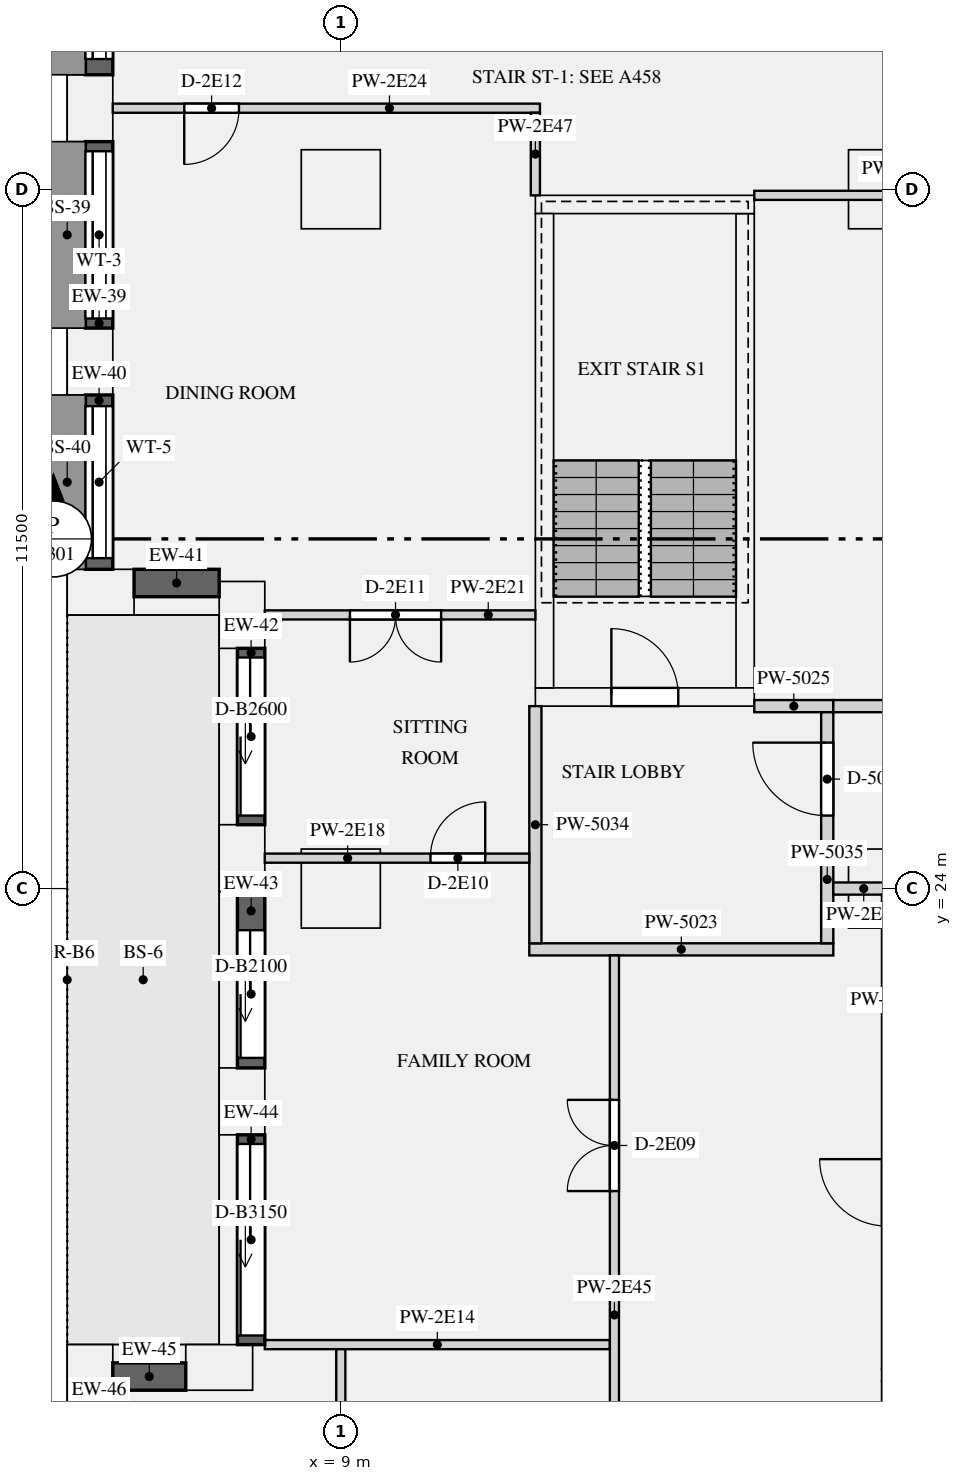
"""IFC4 building model, lengths in metres.
Left out: names, types, materials, properties, quantities, classifications, styles, units other than length and angle.
Written with IfcOpenShell. Run it as: python <this file> out.ifc"""

import sys

from ifc_helpers import new_model, si_unit, direction, frame, frame_2d, origin, origin_2d, place, context, subcontext, project, spatial, rectangle, extrude, element, fill, save


model = new_model("IFC4")
c1 = context("Model", 3, precision=1e-05, world=origin(), true_north=direction((0.0, 1.0)))
c2 = subcontext(c1, "Body", "Model", "MODEL_VIEW")
j1 = project(units=[si_unit("LENGTHUNIT", "METRE"), si_unit("PLANEANGLEUNIT", "RADIAN")], contexts=[c1])
p1 = place(None, origin())
s1 = spatial("IfcSite", under=j1, at=p1, CompositionType="ELEMENT")
p2 = place(p1, origin())
s2 = spatial("IfcBuilding", under=s1, at=p2, CompositionType="ELEMENT")
p3 = place(p2, frame((0.0, 0.0, 118.2)))
s3 = spatial("IfcBuildingStorey", under=s2, at=p3, CompositionType="ELEMENT", Elevation=118.2)
for number, where, z_axis, x_axis in (
    (1, (4.875, 36.833, 0.0), (0.0, 0.0, 1.0), (0.0, -1.0, 0.0)),
    (2, (4.875, 32.667, 0.0), (0.0, 0.0, 1.0), (0.0, -1.0, 0.0)),
    (3, (5.05, 28.875, 0.0), (0.0, 0.0, 1.0), (1.0, 0.0, 0.0)),
    (4, (7.375, 28.5, 0.0), (0.0, 0.0, 1.0), (0.0, -1.0, 0.0)),
    (5, (7.375, 24.5, 0.0), (0.0, 0.0, 1.0), (0.0, -1.0, 0.0)),
    (6, (7.375, 20.5, 0.0), (0.0, 0.0, 1.0), (0.0, -1.0, 0.0)),
    (7, (7.0, 16.125, 0.0), (0.0, 0.0, 1.0), (-1.0, 0.0, 0.0)),
    (8, (4.875, 15.95, 0.0), (0.0, 0.0, 1.0), (0.0, -1.0, 0.0)),
):
    element("IfcColumn", number, at=place(p3, frame(where, z_axis=z_axis, x_axis=x_axis)), inside=s3, PredefinedType="USERDEFINED", context=c2, shape_type="SweptSolid", body=[
        extrude(rectangle(XDim=1.1, YDim=0.75, at=origin_2d()), origin(), (0.0, 0.0, 1.0), 3.15),
    ])
for number, where, z_axis, x_axis in (
    (9, (9.0, 24.0, 0.0), (0.0, 0.0, 1.0), (1.0, 0.0, 0.0)),
    (10, (18.0, 24.0, 0.0), (0.0, 0.0, 1.0), (1.0, 0.0, 0.0)),
    (11, (9.0, 35.5, 0.0), (0.0, 0.0, 1.0), (1.0, 0.0, 0.0)),
    (12, (18.0, 35.5, 0.0), (0.0, 0.0, 1.0), (1.0, 0.0, 0.0)),
):
    element("IfcColumn", number, at=place(p3, frame(where, z_axis=z_axis, x_axis=x_axis)), inside=s3, PredefinedType="COLUMN", context=c2, shape_type="SweptSolid", body=[
        extrude(rectangle(XDim=1.3, YDim=1.3, at=origin_2d()), origin(), (0.0, 0.0, 1.0), 3.15),
    ])
p4 = place(p3, frame((12.2, 27.15, 0.0), z_axis=(0.0, 0.0, 1.0), x_axis=(1.0, 0.0, 0.0)))
e13 = element("IfcWall", 13, at=p4, inside=s3, PredefinedType="SHEAR", context=c2, shape_type="SweptSolid", body=[
    extrude(rectangle(XDim=3.6, YDim=0.3, at=frame_2d((1.8, 0.0))), origin(), (0.0, 0.0, 1.0), 3.15),
])
p5 = place(p4, frame((1.25, 0.0, 0.0)))
e14 = element("IfcOpeningElement", 14, at=p5, cuts=e13, PredefinedType="OPENING", context=c2, shape_type="SweptSolid", body=[
    extrude(rectangle(XDim=1.1, YDim=2.1, at=frame_2d((0.55, 1.05))), frame((0.0, 0.16, 0.0), z_axis=(0.0, -1.0, 0.0), x_axis=(1.0, 0.0, 0.0)), (0.0, 0.0, 1.0), 0.32),
])
p6 = place(p3, frame((12.2, 35.25, 0.0), z_axis=(0.0, 0.0, 1.0), x_axis=(1.0, 0.0, 0.0)))
e15 = element("IfcWall", 15, at=p6, inside=s3, PredefinedType="SHEAR", context=c2, shape_type="SweptSolid", body=[
    extrude(rectangle(XDim=3.6, YDim=0.3, at=frame_2d((1.8, 0.0))), origin(), (0.0, 0.0, 1.0), 3.15),
])
for number, where, z_axis, x_axis in (
    (16, (12.35, 27.3, 0.0), (0.0, 0.0, 1.0), (0.0, 1.0, 0.0)),
    (17, (15.65, 27.3, 0.0), (0.0, 0.0, 1.0), (0.0, 1.0, 0.0)),
):
    element("IfcWall", number, at=place(p3, frame(where, z_axis=z_axis, x_axis=x_axis)), inside=s3, PredefinedType="SHEAR", context=c2, shape_type="SweptSolid", body=[
        extrude(rectangle(XDim=7.8, YDim=0.3, at=frame_2d((3.9, 0.0))), origin(), (0.0, 0.0, 1.0), 3.15),
    ])
p7 = place(p3, frame((5.025, 39.9, 0.9), z_axis=(0.0, 0.0, 1.0), x_axis=(0.0, -1.0, 0.0)))
e18 = element("IfcWall", 18, at=p7, inside=s3, PredefinedType="SOLIDWALL", context=c2, shape_type="SweptSolid", body=[
    extrude(rectangle(XDim=2.517, YDim=0.45, at=frame_2d((1.258, 0.0))), origin(), (0.0, 0.0, 1.0), 1.93),
])
p8 = place(p7, frame((0.259, 0.0, 0.15)))
e19 = element("IfcOpeningElement", 19, at=p8, cuts=e18, PredefinedType="OPENING", context=c2, shape_type="SweptSolid", body=[
    extrude(rectangle(XDim=2.0, YDim=1.5, at=frame_2d((1.0, 0.75))), frame((0.0, 0.235, 0.0), z_axis=(0.0, -1.0, 0.0), x_axis=(1.0, 0.0, 0.0)), (0.0, 0.0, 1.0), 0.47),
])
p9 = place(p3, frame((5.025, 36.283, 0.9), z_axis=(0.0, 0.0, 1.0), x_axis=(0.0, -1.0, 0.0)))
e20 = element("IfcWall", 20, at=p9, inside=s3, PredefinedType="SOLIDWALL", context=c2, shape_type="SweptSolid", body=[
    extrude(rectangle(XDim=3.066, YDim=0.45, at=frame_2d((1.533, 0.0))), origin(), (0.0, 0.0, 1.0), 1.93),
])
p10 = place(p9, frame((0.158, 0.0, 0.15)))
e21 = element("IfcOpeningElement", 21, at=p10, cuts=e20, PredefinedType="OPENING", context=c2, shape_type="SweptSolid", body=[
    extrude(rectangle(XDim=2.75, YDim=1.5, at=frame_2d((1.375, 0.75))), frame((0.0, 0.235, 0.0), z_axis=(0.0, -1.0, 0.0), x_axis=(1.0, 0.0, 0.0)), (0.0, 0.0, 1.0), 0.47),
])
p11 = place(p3, frame((5.025, 32.117, 0.9), z_axis=(0.0, 0.0, 1.0), x_axis=(0.0, -1.0, 0.0)))
e22 = element("IfcWall", 22, at=p11, inside=s3, PredefinedType="SOLIDWALL", context=c2, shape_type="SweptSolid", body=[
    extrude(rectangle(XDim=2.867, YDim=0.45, at=frame_2d((1.434, 0.0))), origin(), (0.0, 0.0, 1.0), 1.93),
])
p12 = place(p11, frame((0.184, 0.0, 0.15)))
e23 = element("IfcOpeningElement", 23, at=p12, cuts=e22, PredefinedType="OPENING", context=c2, shape_type="SweptSolid", body=[
    extrude(rectangle(XDim=2.5, YDim=1.5, at=frame_2d((1.25, 0.75))), frame((0.0, 0.235, 0.0), z_axis=(0.0, -1.0, 0.0), x_axis=(1.0, 0.0, 0.0)), (0.0, 0.0, 1.0), 0.47),
])
p13 = place(p3, frame((5.6, 29.025, 0.9), z_axis=(0.0, 0.0, 1.0), x_axis=(1.0, 0.0, 0.0)))
e24 = element("IfcWall", 24, at=p13, inside=s3, PredefinedType="SOLIDWALL", context=c2, shape_type="SweptSolid", body=[
    extrude(rectangle(XDim=1.4, YDim=0.45, at=frame_2d((0.7, 0.0))), origin(), (0.0, 0.0, 1.0), 1.93),
])
p14 = place(p3, frame((7.525, 27.95, 0.0), z_axis=(0.0, 0.0, 1.0), x_axis=(0.0, -1.0, 0.0)))
e25 = element("IfcWall", 25, at=p14, inside=s3, PredefinedType="SOLIDWALL", context=c2, shape_type="SweptSolid", body=[
    extrude(rectangle(XDim=2.9, YDim=0.45, at=frame_2d((1.45, 0.0))), origin(), (0.0, 0.0, 1.0), 2.83),
])
p15 = place(p14, frame((0.15, 0.0, 0.0)))
e26 = element("IfcOpeningElement", 26, at=p15, cuts=e25, PredefinedType="OPENING", context=c2, shape_type="SweptSolid", body=[
    extrude(rectangle(XDim=2.6, YDim=2.3, at=frame_2d((1.3, 1.15))), frame((0.0, 0.235, 0.0), z_axis=(0.0, -1.0, 0.0), x_axis=(1.0, 0.0, 0.0)), (0.0, 0.0, 1.0), 0.47),
])
p16 = place(p3, frame((7.525, 23.95, 0.0), z_axis=(0.0, 0.0, 1.0), x_axis=(0.0, -1.0, 0.0)))
e27 = element("IfcWall", 27, at=p16, inside=s3, PredefinedType="SOLIDWALL", context=c2, shape_type="SweptSolid", body=[
    extrude(rectangle(XDim=2.9, YDim=0.45, at=frame_2d((1.45, 0.0))), origin(), (0.0, 0.0, 1.0), 2.83),
])
p17 = place(p16, frame((0.635, 0.0, 0.0)))
e28 = element("IfcOpeningElement", 28, at=p17, cuts=e27, PredefinedType="OPENING", context=c2, shape_type="SweptSolid", body=[
    extrude(rectangle(XDim=2.1, YDim=2.3, at=frame_2d((1.05, 1.15))), frame((0.0, 0.235, 0.0), z_axis=(0.0, -1.0, 0.0), x_axis=(1.0, 0.0, 0.0)), (0.0, 0.0, 1.0), 0.47),
])
p18 = place(p3, frame((7.525, 19.95, 0.0), z_axis=(0.0, 0.0, 1.0), x_axis=(0.0, -1.0, 0.0)))
e29 = element("IfcWall", 29, at=p18, inside=s3, PredefinedType="SOLIDWALL", context=c2, shape_type="SweptSolid", body=[
    extrude(rectangle(XDim=3.45, YDim=0.45, at=frame_2d((1.725, 0.0))), origin(), (0.0, 0.0, 1.0), 2.83),
])
p19 = place(p18, frame((0.15, 0.0, 0.0)))
e30 = element("IfcOpeningElement", 30, at=p19, cuts=e29, PredefinedType="OPENING", context=c2, shape_type="SweptSolid", body=[
    extrude(rectangle(XDim=3.15, YDim=2.3, at=frame_2d((1.575, 1.15))), frame((0.0, 0.235, 0.0), z_axis=(0.0, -1.0, 0.0), x_axis=(1.0, 0.0, 0.0)), (0.0, 0.0, 1.0), 0.47),
])
p20 = place(p3, frame((6.45, 15.975, 0.9), z_axis=(0.0, 0.0, 1.0), x_axis=(-1.0, 0.0, 0.0)))
e31 = element("IfcWall", 31, at=p20, inside=s3, PredefinedType="SOLIDWALL", context=c2, shape_type="SweptSolid", body=[
    extrude(rectangle(XDim=1.2, YDim=0.45, at=frame_2d((0.6, 0.0))), origin(), (0.0, 0.0, 1.0), 1.93),
])
p21 = place(p3, frame((12.1, 23.0, 0.0), z_axis=(0.0, 0.0, 1.0), x_axis=(1.0, 0.0, 0.0)))
e32 = element("IfcWall", 32, at=p21, inside=s3, PredefinedType="PARTITIONING", context=c2, shape_type="SweptSolid", body=[
    extrude(rectangle(XDim=5.0, YDim=0.2, at=frame_2d((2.5, 0.0))), origin(), (0.0, 0.0, 1.0), 2.83),
])
p22 = place(p3, frame((15.8, 27.0, 0.0), z_axis=(0.0, 0.0, 1.0), x_axis=(1.0, 0.0, 0.0)))
e33 = element("IfcWall", 33, at=p22, inside=s3, PredefinedType="PARTITIONING", context=c2, shape_type="SweptSolid", body=[
    extrude(rectangle(XDim=1.3, YDim=0.2, at=frame_2d((0.65, 0.0))), origin(), (0.0, 0.0, 1.0), 2.83),
])
p23 = place(p3, frame((12.2, 23.1, 0.0), z_axis=(0.0, 0.0, 1.0), x_axis=(0.0, 1.0, 0.0)))
e34 = element("IfcWall", 34, at=p23, inside=s3, PredefinedType="PARTITIONING", context=c2, shape_type="SweptSolid", body=[
    extrude(rectangle(XDim=3.9, YDim=0.2, at=frame_2d((1.95, 0.0))), origin(), (0.0, 0.0, 1.0), 2.83),
])
p24 = place(p3, frame((17.0, 23.1, 0.0), z_axis=(0.0, 0.0, 1.0), x_axis=(0.0, 1.0, 0.0)))
e35 = element("IfcWall", 35, at=p24, inside=s3, PredefinedType="PARTITIONING", context=c2, shape_type="SweptSolid", body=[
    extrude(rectangle(XDim=3.8, YDim=0.2, at=frame_2d((1.9, 0.0))), origin(), (0.0, 0.0, 1.0), 2.83),
])
p25 = place(p24, frame((2.1, 0.0, 0.0)))
e36 = element("IfcOpeningElement", 36, at=p25, cuts=e35, PredefinedType="OPENING", context=c2, shape_type="SweptSolid", body=[
    extrude(rectangle(XDim=1.2, YDim=2.1, at=frame_2d((0.6, 1.05))), frame((0.0, 0.11, 0.0), z_axis=(0.0, -1.0, 0.0), x_axis=(1.0, 0.0, 0.0)), (0.0, 0.0, 1.0), 0.22),
])
p26 = place(p3, frame((17.1, 24.0, 0.0), z_axis=(0.0, 0.0, 1.0), x_axis=(1.0, 0.0, 0.0)))
e37 = element("IfcWall", 37, at=p26, inside=s3, PredefinedType="PARTITIONING", context=c2, shape_type="SweptSolid", body=[
    extrude(rectangle(XDim=1.0, YDim=0.2, at=frame_2d((0.5, 0.0))), origin(), (0.0, 0.0, 1.0), 2.83),
])
p27 = place(p3, frame((17.1, 27.0, 0.0), z_axis=(0.0, 0.0, 1.0), x_axis=(1.0, 0.0, 0.0)))
e38 = element("IfcWall", 38, at=p27, inside=s3, PredefinedType="PARTITIONING", context=c2, shape_type="SweptSolid", body=[
    extrude(rectangle(XDim=7.0, YDim=0.2, at=frame_2d((3.5, 0.0))), origin(), (0.0, 0.0, 1.0), 2.83),
])
p28 = place(p3, frame((7.75, 16.5, 0.0), z_axis=(0.0, 0.0, 1.0), x_axis=(1.0, 0.0, 0.0)))
e39 = element("IfcWall", 39, at=p28, inside=s3, PredefinedType="PARTITIONING", context=c2, shape_type="SweptSolid", body=[
    extrude(rectangle(XDim=5.675, YDim=0.15, at=frame_2d((2.837, 0.0))), origin(), (0.0, 0.0, 1.0), 2.83),
])
p29 = place(p3, frame((7.75, 24.5, 0.0), z_axis=(0.0, 0.0, 1.0), x_axis=(1.0, 0.0, 0.0)))
e40 = element("IfcWall", 40, at=p29, inside=s3, PredefinedType="PARTITIONING", context=c2, shape_type="SweptSolid", body=[
    extrude(rectangle(XDim=4.35, YDim=0.15, at=frame_2d((2.175, 0.0))), origin(), (0.0, 0.0, 1.0), 2.83),
])
p30 = place(p29, frame((2.725, 0.0, 0.0)))
e41 = element("IfcOpeningElement", 41, at=p30, cuts=e40, PredefinedType="OPENING", context=c2, shape_type="SweptSolid", body=[
    extrude(rectangle(XDim=0.9, YDim=2.1, at=frame_2d((0.45, 1.05))), frame((0.0, 0.085, 0.0), z_axis=(0.0, -1.0, 0.0), x_axis=(1.0, 0.0, 0.0)), (0.0, 0.0, 1.0), 0.17),
])
p31 = place(p3, frame((7.75, 28.5, 0.0), z_axis=(0.0, 0.0, 1.0), x_axis=(1.0, 0.0, 0.0)))
e42 = element("IfcWall", 42, at=p31, inside=s3, PredefinedType="PARTITIONING", context=c2, shape_type="SweptSolid", body=[
    extrude(rectangle(XDim=4.45, YDim=0.15, at=frame_2d((2.225, 0.0))), origin(), (0.0, 0.0, 1.0), 2.83),
])
p32 = place(p31, frame((1.4, 0.0, 0.0)))
e43 = element("IfcOpeningElement", 43, at=p32, cuts=e42, PredefinedType="OPENING", context=c2, shape_type="SweptSolid", body=[
    extrude(rectangle(XDim=1.5, YDim=2.1, at=frame_2d((0.75, 1.05))), frame((0.0, 0.085, 0.0), z_axis=(0.0, -1.0, 0.0), x_axis=(1.0, 0.0, 0.0)), (0.0, 0.0, 1.0), 0.17),
])
p33 = place(p3, frame((5.25, 36.833, 0.0), z_axis=(0.0, 0.0, 1.0), x_axis=(1.0, 0.0, 0.0)))
e44 = element("IfcWall", 44, at=p33, inside=s3, PredefinedType="PARTITIONING", context=c2, shape_type="SweptSolid", body=[
    extrude(rectangle(XDim=7.025, YDim=0.15, at=frame_2d((3.512, 0.0))), origin(), (0.0, 0.0, 1.0), 2.83),
])
p34 = place(p33, frame((1.175, 0.0, 0.0)))
e45 = element("IfcOpeningElement", 45, at=p34, cuts=e44, PredefinedType="OPENING", context=c2, shape_type="SweptSolid", body=[
    extrude(rectangle(XDim=0.9, YDim=2.1, at=frame_2d((0.45, 1.05))), frame((0.0, 0.085, 0.0), z_axis=(0.0, -1.0, 0.0), x_axis=(1.0, 0.0, 0.0)), (0.0, 0.0, 1.0), 0.17),
])
p35 = place(p3, frame((15.8, 35.4, 0.0), z_axis=(0.0, 0.0, 1.0), x_axis=(1.0, 0.0, 0.0)))
e46 = element("IfcWall", 46, at=p35, inside=s3, PredefinedType="PARTITIONING", context=c2, shape_type="SweptSolid", body=[
    extrude(rectangle(XDim=8.1, YDim=0.15, at=frame_2d((4.05, 0.0))), origin(), (0.0, 0.0, 1.0), 2.83),
])
p36 = place(p35, frame((4.775, 0.0, 0.0)))
e47 = element("IfcOpeningElement", 47, at=p36, cuts=e46, PredefinedType="OPENING", context=c2, shape_type="SweptSolid", body=[
    extrude(rectangle(XDim=1.5, YDim=2.1, at=frame_2d((0.75, 1.05))), frame((0.0, 0.085, 0.0), z_axis=(0.0, -1.0, 0.0), x_axis=(1.0, 0.0, 0.0)), (0.0, 0.0, 1.0), 0.17),
])
p37 = place(p3, frame((9.0, 12.575, 0.0), z_axis=(0.0, 0.0, 1.0), x_axis=(0.0, 1.0, 0.0)))
e48 = element("IfcWall", 48, at=p37, inside=s3, PredefinedType="PARTITIONING", context=c2, shape_type="SweptSolid", body=[
    extrude(rectangle(XDim=3.85, YDim=0.15, at=frame_2d((1.925, 0.0))), origin(), (0.0, 0.0, 1.0), 2.83),
])
p38 = place(p3, frame((13.5, 12.575, 0.0), z_axis=(0.0, 0.0, 1.0), x_axis=(0.0, 1.0, 0.0)))
e49 = element("IfcWall", 49, at=p38, inside=s3, PredefinedType="PARTITIONING", context=c2, shape_type="SweptSolid", body=[
    extrude(rectangle(XDim=10.325, YDim=0.15, at=frame_2d((5.163, 0.0))), origin(), (0.0, 0.0, 1.0), 2.83),
])
p39 = place(p38, frame((1.475, 0.0, 0.0)))
e50 = element("IfcOpeningElement", 50, at=p39, cuts=e49, PredefinedType="OPENING", context=c2, shape_type="SweptSolid", body=[
    extrude(rectangle(XDim=0.9, YDim=2.1, at=frame_2d((0.45, 1.05))), frame((0.0, 0.085, 0.0), z_axis=(0.0, -1.0, 0.0), x_axis=(1.0, 0.0, 0.0)), (0.0, 0.0, 1.0), 0.17),
])
p40 = place(p38, frame((6.45, 0.0, 0.0)))
e51 = element("IfcOpeningElement", 51, at=p40, cuts=e49, PredefinedType="OPENING", context=c2, shape_type="SweptSolid", body=[
    extrude(rectangle(XDim=1.5, YDim=2.1, at=frame_2d((0.75, 1.05))), frame((0.0, 0.085, 0.0), z_axis=(0.0, -1.0, 0.0), x_axis=(1.0, 0.0, 0.0)), (0.0, 0.0, 1.0), 0.17),
])
p41 = place(p3, frame((12.2, 35.4, 0.0), z_axis=(0.0, 0.0, 1.0), x_axis=(0.0, 1.0, 0.0)))
e52 = element("IfcWall", 52, at=p41, inside=s3, PredefinedType="PARTITIONING", context=c2, shape_type="SweptSolid", body=[
    extrude(rectangle(XDim=1.358, YDim=0.15, at=frame_2d((0.679, 0.0))), origin(), (0.0, 0.0, 1.0), 2.83),
])
p42 = place(p8, origin())
e53 = element("IfcWindow", 53, at=p42, inside=s3, PartitioningType="SINGLE_PANEL", PredefinedType="WINDOW", context=c2, shape_type="SweptSolid", body=[
    extrude(rectangle(XDim=2.0, YDim=1.5, at=frame_2d((1.0, 0.75))), frame((0.0, -0.065, 0.0), z_axis=(0.0, -1.0, 0.0), x_axis=(1.0, 0.0, 0.0)), (0.0, 0.0, 1.0), 0.06),
])
fill(e19, e53)
p43 = place(p10, origin())
e54 = element("IfcWindow", 54, at=p43, inside=s3, PartitioningType="SINGLE_PANEL", PredefinedType="WINDOW", context=c2, shape_type="SweptSolid", body=[
    extrude(rectangle(XDim=2.75, YDim=1.5, at=frame_2d((1.375, 0.75))), frame((0.0, -0.065, 0.0), z_axis=(0.0, -1.0, 0.0), x_axis=(1.0, 0.0, 0.0)), (0.0, 0.0, 1.0), 0.06),
])
fill(e21, e54)
p44 = place(p12, origin())
e55 = element("IfcWindow", 55, at=p44, inside=s3, PartitioningType="SINGLE_PANEL", PredefinedType="WINDOW", context=c2, shape_type="SweptSolid", body=[
    extrude(rectangle(XDim=2.5, YDim=1.5, at=frame_2d((1.25, 0.75))), frame((0.0, -0.065, 0.0), z_axis=(0.0, -1.0, 0.0), x_axis=(1.0, 0.0, 0.0)), (0.0, 0.0, 1.0), 0.06),
])
fill(e23, e55)
p45 = place(p15, origin())
e56 = element("IfcDoor", 56, at=p45, inside=s3, OperationType="SLIDING_TO_LEFT", PredefinedType="DOOR", context=c2, shape_type="SweptSolid", body=[
    extrude(rectangle(XDim=2.6, YDim=2.3, at=frame_2d((1.3, 1.15))), frame((0.0, -0.07, 0.0), z_axis=(0.0, -1.0, 0.0), x_axis=(1.0, 0.0, 0.0)), (0.0, 0.0, 1.0), 0.05),
])
fill(e26, e56)
p46 = place(p17, origin())
e57 = element("IfcDoor", 57, at=p46, inside=s3, OperationType="SLIDING_TO_LEFT", PredefinedType="DOOR", context=c2, shape_type="SweptSolid", body=[
    extrude(rectangle(XDim=2.1, YDim=2.3, at=frame_2d((1.05, 1.15))), frame((0.0, -0.07, 0.0), z_axis=(0.0, -1.0, 0.0), x_axis=(1.0, 0.0, 0.0)), (0.0, 0.0, 1.0), 0.05),
])
fill(e28, e57)
p47 = place(p19, origin())
e58 = element("IfcDoor", 58, at=p47, inside=s3, OperationType="SLIDING_TO_LEFT", PredefinedType="DOOR", context=c2, shape_type="SweptSolid", body=[
    extrude(rectangle(XDim=3.15, YDim=2.3, at=frame_2d((1.575, 1.15))), frame((0.0, -0.07, 0.0), z_axis=(0.0, -1.0, 0.0), x_axis=(1.0, 0.0, 0.0)), (0.0, 0.0, 1.0), 0.05),
])
fill(e30, e58)
p48 = place(p5, origin())
e59 = element("IfcDoor", 59, at=p48, inside=s3, OperationType="SINGLE_SWING_LEFT", PredefinedType="DOOR", context=c2, shape_type="SweptSolid", body=[
    extrude(rectangle(XDim=1.1, YDim=2.1, at=frame_2d((0.55, 1.05))), frame((0.0, 0.025, 0.0), z_axis=(0.0, -1.0, 0.0), x_axis=(1.0, 0.0, 0.0)), (0.0, 0.0, 1.0), 0.05),
])
fill(e14, e59)
p49 = place(p25, origin())
e60 = element("IfcDoor", 60, at=p49, inside=s3, OperationType="SINGLE_SWING_RIGHT", PredefinedType="DOOR", context=c2, shape_type="SweptSolid", body=[
    extrude(rectangle(XDim=1.2, YDim=2.1, at=frame_2d((0.6, 1.05))), frame((0.0, 0.025, 0.0), z_axis=(0.0, -1.0, 0.0), x_axis=(1.0, 0.0, 0.0)), (0.0, 0.0, 1.0), 0.05),
])
fill(e36, e60)
p50 = place(p40, origin())
e61 = element("IfcDoor", 61, at=p50, inside=s3, OperationType="DOUBLE_DOOR_SINGLE_SWING", PredefinedType="DOOR", context=c2, shape_type="SweptSolid", body=[
    extrude(rectangle(XDim=1.5, YDim=2.1, at=frame_2d((0.75, 1.05))), frame((0.0, 0.025, 0.0), z_axis=(0.0, -1.0, 0.0), x_axis=(1.0, 0.0, 0.0)), (0.0, 0.0, 1.0), 0.05),
])
fill(e51, e61)
p51 = place(p30, origin())
e62 = element("IfcDoor", 62, at=p51, inside=s3, OperationType="SINGLE_SWING_RIGHT", PredefinedType="DOOR", context=c2, shape_type="SweptSolid", body=[
    extrude(rectangle(XDim=0.9, YDim=2.1, at=frame_2d((0.45, 1.05))), frame((0.0, 0.025, 0.0), z_axis=(0.0, -1.0, 0.0), x_axis=(1.0, 0.0, 0.0)), (0.0, 0.0, 1.0), 0.05),
])
fill(e41, e62)
p52 = place(p32, frame((1.5, 0.0, 0.0), z_axis=(0.0, 0.0, 1.0), x_axis=(-1.0, 0.0, 0.0)))
e63 = element("IfcDoor", 63, at=p52, inside=s3, OperationType="DOUBLE_DOOR_SINGLE_SWING", PredefinedType="DOOR", context=c2, shape_type="SweptSolid", body=[
    extrude(rectangle(XDim=1.5, YDim=2.1, at=frame_2d((0.75, 1.05))), frame((0.0, 0.025, 0.0), z_axis=(0.0, -1.0, 0.0), x_axis=(1.0, 0.0, 0.0)), (0.0, 0.0, 1.0), 0.05),
])
fill(e43, e63)
p53 = place(p34, frame((0.9, 0.0, 0.0), z_axis=(0.0, 0.0, 1.0), x_axis=(-1.0, 0.0, 0.0)))
e64 = element("IfcDoor", 64, at=p53, inside=s3, OperationType="SINGLE_SWING_RIGHT", PredefinedType="DOOR", context=c2, shape_type="SweptSolid", body=[
    extrude(rectangle(XDim=0.9, YDim=2.1, at=frame_2d((0.45, 1.05))), frame((0.0, 0.025, 0.0), z_axis=(0.0, -1.0, 0.0), x_axis=(1.0, 0.0, 0.0)), (0.0, 0.0, 1.0), 0.05),
])
fill(e45, e64)
save(model, sys.argv[1])
